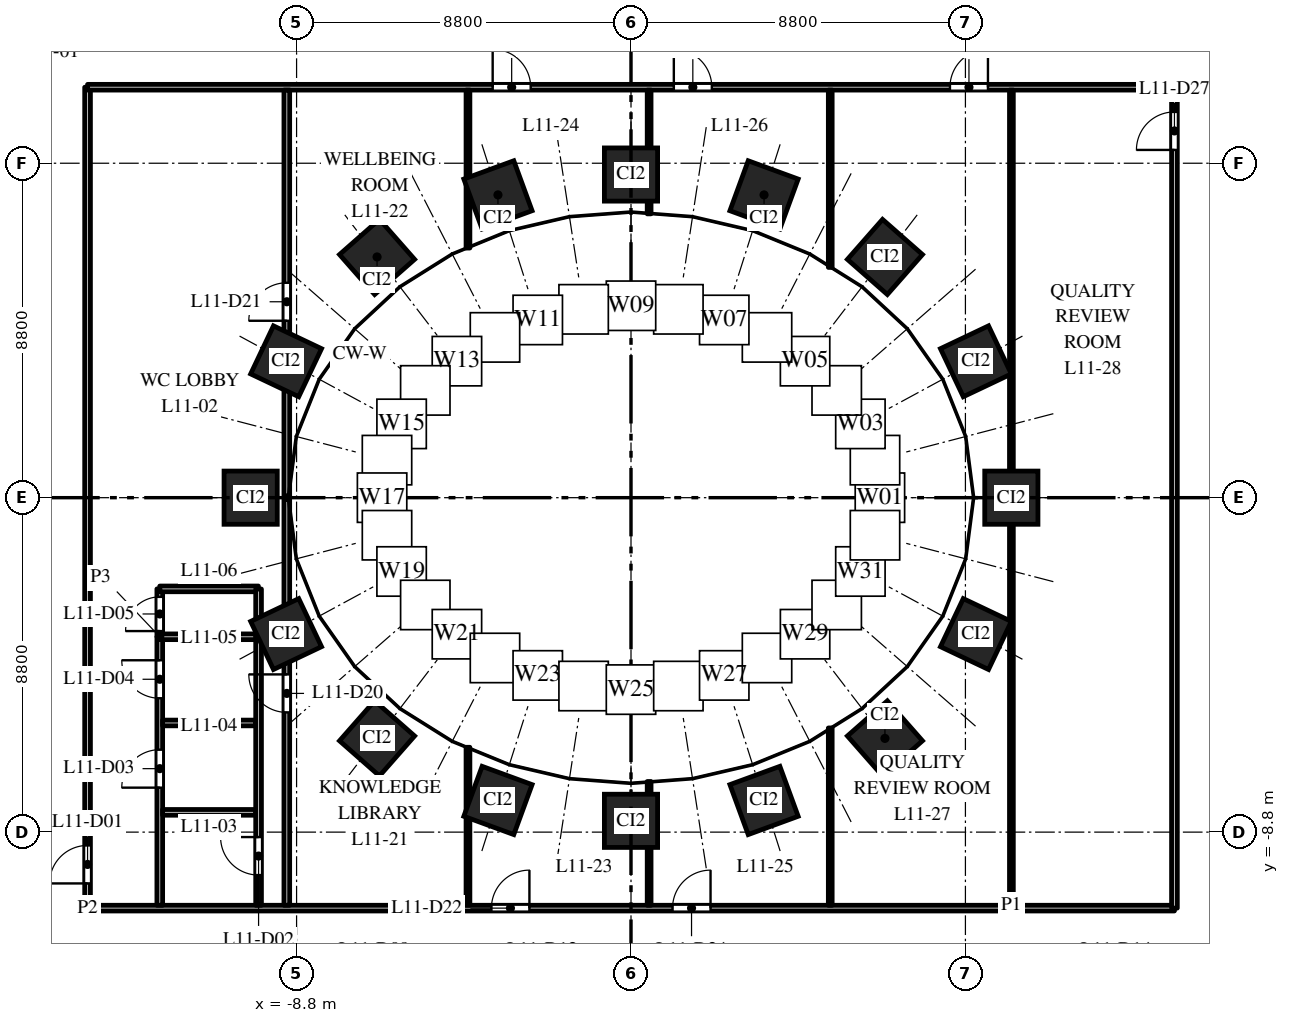
"""IFC4 building model, lengths in metres.
Left out: names, types, materials, properties, quantities, classifications, styles, units other than length and angle.
Written with IfcOpenShell. Run it as: python <this file> out.ifc"""

import sys

from ifc_helpers import new_model, si_unit, direction, frame, frame_2d, origin, origin_2d, place, context, subcontext, project, spatial, rectangle, extrude, element, fill, save


model = new_model("IFC4")
c1 = context("Model", 3, precision=1e-05, world=origin(), true_north=direction((0.0, 1.0)))
c2 = subcontext(c1, "Body", "Model", "MODEL_VIEW")
j1 = project(units=[si_unit("LENGTHUNIT", "METRE"), si_unit("PLANEANGLEUNIT", "RADIAN")], contexts=[c1])
p1 = place(None, origin())
s1 = spatial("IfcSite", under=j1, at=p1, CompositionType="ELEMENT")
p2 = place(p1, origin())
s2 = spatial("IfcBuilding", under=s1, at=p2, CompositionType="ELEMENT")
p3 = place(p2, frame((0.0, 0.0, 54.5)))
s3 = spatial("IfcBuildingStorey", under=s2, at=p3, CompositionType="ELEMENT", Elevation=54.5)
for number, where, z_axis, x_axis in (
    (1, (10.008, 0.0, 0.0), (0.0, 0.0, 1.0), (0.0, 1.0, 0.0)),
    (2, (9.076, 3.588, 0.0), (0.0, 0.0, 1.0), (-0.429, 0.903, 0.0)),
    (3, (6.682, 6.334, 0.0), (0.0, 0.0, 1.0), (-0.751, 0.66, 0.0)),
    (4, (3.501, 7.967, 0.0), (0.0, 0.0, 1.0), (-0.939, 0.344, 0.0)),
    (5, (0.0, 8.503, 0.0), (0.0, 0.0, 1.0), (-1.0, 0.0, 0.0)),
    (6, (-3.501, 7.967, 0.0), (0.0, 0.0, 1.0), (-0.939, -0.344, 0.0)),
    (7, (-6.682, 6.334, 0.0), (0.0, 0.0, 1.0), (-0.751, -0.66, 0.0)),
    (8, (-9.076, 3.588, 0.0), (0.0, 0.0, 1.0), (-0.429, -0.903, 0.0)),
    (9, (-10.008, 0.0, 0.0), (0.0, 0.0, 1.0), (0.0, -1.0, 0.0)),
    (10, (-9.076, -3.588, 0.0), (0.0, 0.0, 1.0), (0.429, -0.903, 0.0)),
    (11, (-6.682, -6.334, 0.0), (0.0, 0.0, 1.0), (0.751, -0.66, 0.0)),
    (12, (-3.501, -7.967, 0.0), (0.0, 0.0, 1.0), (0.939, -0.344, 0.0)),
    (13, (0.0, -8.503, 0.0), (0.0, 0.0, 1.0), (1.0, 0.0, 0.0)),
    (14, (3.501, -7.967, 0.0), (0.0, 0.0, 1.0), (0.939, 0.344, 0.0)),
    (15, (6.682, -6.334, 0.0), (0.0, 0.0, 1.0), (0.751, 0.66, 0.0)),
    (16, (9.076, -3.588, 0.0), (0.0, 0.0, 1.0), (0.429, 0.903, 0.0)),
):
    element("IfcColumn", number, at=place(p3, frame(where, z_axis=z_axis, x_axis=x_axis)), inside=s3, PredefinedType="COLUMN", context=c2, shape_type="SweptSolid", body=[
        extrude(rectangle(XDim=1.4, YDim=1.4, at=origin_2d()), origin(), (0.0, 0.0, 1.0), 4.0),
    ])
p4 = place(p3, frame((-14.3, -10.8, 0.0), z_axis=(0.0, 0.0, 1.0), x_axis=(0.0, 1.0, 0.0)))
e17 = element("IfcWall", 17, at=p4, inside=s3, PredefinedType="PARTITIONING", context=c2, shape_type="SweptSolid", body=[
    extrude(rectangle(XDim=21.6, YDim=0.15, at=frame_2d((10.8, 0.0))), origin(), (0.0, 0.0, 1.0), 2.75),
])
p5 = place(p4, frame((0.65, 0.0, 0.0)))
e18 = element("IfcOpeningElement", 18, at=p5, cuts=e17, PredefinedType="OPENING", context=c2, shape_type="SweptSolid", body=[
    extrude(rectangle(XDim=1.0, YDim=2.1, at=frame_2d((0.5, 1.05))), frame((0.0, 0.085, 0.0), z_axis=(0.0, -1.0, 0.0), x_axis=(1.0, 0.0, 0.0)), (0.0, 0.0, 1.0), 0.17),
])
p6 = place(p3, frame((-14.3, -10.8, 0.0), z_axis=(0.0, 0.0, 1.0), x_axis=(1.0, 0.0, 0.0)))
e19 = element("IfcWall", 19, at=p6, inside=s3, PredefinedType="PARTITIONING", context=c2, shape_type="SweptSolid", body=[
    extrude(rectangle(XDim=28.6, YDim=0.15, at=frame_2d((14.3, 0.0))), origin(), (0.0, 0.0, 1.0), 2.85),
])
p7 = place(p6, frame((10.627, 0.0, 0.0)))
e20 = element("IfcOpeningElement", 20, at=p7, cuts=e19, PredefinedType="OPENING", context=c2, shape_type="SweptSolid", body=[
    extrude(rectangle(XDim=1.0, YDim=2.1, at=frame_2d((0.5, 1.05))), frame((0.0, 0.085, 0.0), z_axis=(0.0, -1.0, 0.0), x_axis=(1.0, 0.0, 0.0)), (0.0, 0.0, 1.0), 0.17),
])
p8 = place(p6, frame((15.393, 0.0, 0.0)))
e21 = element("IfcOpeningElement", 21, at=p8, cuts=e19, PredefinedType="OPENING", context=c2, shape_type="SweptSolid", body=[
    extrude(rectangle(XDim=1.0, YDim=2.1, at=frame_2d((0.5, 1.05))), frame((0.0, 0.085, 0.0), z_axis=(0.0, -1.0, 0.0), x_axis=(1.0, 0.0, 0.0)), (0.0, 0.0, 1.0), 0.17),
])
p9 = place(p3, frame((-14.3, 10.8, 0.0), z_axis=(0.0, 0.0, 1.0), x_axis=(1.0, 0.0, 0.0)))
e22 = element("IfcWall", 22, at=p9, inside=s3, PredefinedType="PARTITIONING", context=c2, shape_type="SweptSolid", body=[
    extrude(rectangle(XDim=28.6, YDim=0.15, at=frame_2d((14.3, 0.0))), origin(), (0.0, 0.0, 1.0), 2.85),
])
p10 = place(p9, frame((10.66, 0.0, 0.0)))
e23 = element("IfcOpeningElement", 23, at=p10, cuts=e22, PredefinedType="OPENING", context=c2, shape_type="SweptSolid", body=[
    extrude(rectangle(XDim=1.0, YDim=2.1, at=frame_2d((0.5, 1.05))), frame((0.0, 0.085, 0.0), z_axis=(0.0, -1.0, 0.0), x_axis=(1.0, 0.0, 0.0)), (0.0, 0.0, 1.0), 0.17),
])
p11 = place(p9, frame((15.427, 0.0, 0.0)))
e24 = element("IfcOpeningElement", 24, at=p11, cuts=e22, PredefinedType="OPENING", context=c2, shape_type="SweptSolid", body=[
    extrude(rectangle(XDim=1.0, YDim=2.1, at=frame_2d((0.5, 1.05))), frame((0.0, 0.085, 0.0), z_axis=(0.0, -1.0, 0.0), x_axis=(1.0, 0.0, 0.0)), (0.0, 0.0, 1.0), 0.17),
])
p12 = place(p9, frame((22.693, 0.0, 0.0)))
e25 = element("IfcOpeningElement", 25, at=p12, cuts=e22, PredefinedType="OPENING", context=c2, shape_type="SweptSolid", body=[
    extrude(rectangle(XDim=1.0, YDim=2.1, at=frame_2d((0.5, 1.05))), frame((0.0, 0.085, 0.0), z_axis=(0.0, -1.0, 0.0), x_axis=(1.0, 0.0, 0.0)), (0.0, 0.0, 1.0), 0.17),
])
p13 = place(p3, frame((-12.4, -10.725, 0.0), z_axis=(0.0, 0.0, 1.0), x_axis=(0.0, 1.0, 0.0)))
e26 = element("IfcWall", 26, at=p13, inside=s3, PredefinedType="PARTITIONING", context=c2, shape_type="SweptSolid", body=[
    extrude(rectangle(XDim=7.065, YDim=0.15, at=frame_2d((3.533, 0.0))), origin(), (0.0, 0.0, 1.0), 2.75),
])
p14 = place(p13, frame((3.095, 0.0, 0.0)))
e27 = element("IfcOpeningElement", 27, at=p14, cuts=e26, PredefinedType="OPENING", context=c2, shape_type="SweptSolid", body=[
    extrude(rectangle(XDim=1.0, YDim=2.1, at=frame_2d((0.5, 1.05))), frame((0.0, 0.085, 0.0), z_axis=(0.0, -1.0, 0.0), x_axis=(1.0, 0.0, 0.0)), (0.0, 0.0, 1.0), 0.17),
])
p15 = place(p13, frame((5.447, 0.0, 0.0)))
e28 = element("IfcOpeningElement", 28, at=p15, cuts=e26, PredefinedType="OPENING", context=c2, shape_type="SweptSolid", body=[
    extrude(rectangle(XDim=1.0, YDim=2.1, at=frame_2d((0.5, 1.05))), frame((0.0, 0.085, 0.0), z_axis=(0.0, -1.0, 0.0), x_axis=(1.0, 0.0, 0.0)), (0.0, 0.0, 1.0), 0.17),
])
p16 = place(p3, frame((-12.325, -8.28, 0.0), z_axis=(0.0, 0.0, 1.0), x_axis=(1.0, 0.0, 0.0)))
e29 = element("IfcWall", 29, at=p16, inside=s3, PredefinedType="PARTITIONING", context=c2, shape_type="SweptSolid", body=[
    extrude(rectangle(XDim=2.45, YDim=0.15, at=frame_2d((1.225, 0.0))), origin(), (0.0, 0.0, 1.0), 2.75),
])
p17 = place(p3, frame((-12.325, -5.928, 0.0), z_axis=(0.0, 0.0, 1.0), x_axis=(1.0, 0.0, 0.0)))
e30 = element("IfcWall", 30, at=p17, inside=s3, PredefinedType="PARTITIONING", context=c2, shape_type="SweptSolid", body=[
    extrude(rectangle(XDim=2.45, YDim=0.15, at=frame_2d((1.225, 0.0))), origin(), (0.0, 0.0, 1.0), 3.7),
])
p18 = place(p3, frame((-12.4, -3.66, 0.0), z_axis=(0.0, 0.0, 1.0), x_axis=(0.0, 1.0, 0.0)))
e31 = element("IfcWall", 31, at=p18, inside=s3, PredefinedType="PARTITIONING", context=c2, shape_type="SweptSolid", body=[
    extrude(rectangle(XDim=1.26, YDim=0.15, at=frame_2d((0.63, 0.0))), origin(), (0.0, 0.0, 1.0), 3.7),
])
p19 = place(p18, frame((0.15, 0.0, 0.0)))
e32 = element("IfcOpeningElement", 32, at=p19, cuts=e31, PredefinedType="OPENING", context=c2, shape_type="SweptSolid", body=[
    extrude(rectangle(XDim=0.9, YDim=2.1, at=frame_2d((0.45, 1.05))), frame((0.0, 0.085, 0.0), z_axis=(0.0, -1.0, 0.0), x_axis=(1.0, 0.0, 0.0)), (0.0, 0.0, 1.0), 0.17),
])
p20 = place(p3, frame((-12.4, -3.66, 0.0), z_axis=(0.0, 0.0, 1.0), x_axis=(1.0, 0.0, 0.0)))
e33 = element("IfcWall", 33, at=p20, inside=s3, PredefinedType="PARTITIONING", context=c2, shape_type="SweptSolid", body=[
    extrude(rectangle(XDim=2.6, YDim=0.15, at=frame_2d((1.3, 0.0))), origin(), (0.0, 0.0, 1.0), 3.7),
])
p21 = place(p3, frame((-12.4, -2.4, 0.0), z_axis=(0.0, 0.0, 1.0), x_axis=(1.0, 0.0, 0.0)))
e34 = element("IfcWall", 34, at=p21, inside=s3, PredefinedType="PARTITIONING", context=c2, shape_type="SweptSolid", body=[
    extrude(rectangle(XDim=2.596, YDim=0.15, at=frame_2d((1.298, 0.0))), origin(), (0.0, 0.0, 1.0), 3.7),
])
p22 = place(p3, frame((-9.8, -10.725, 0.0), z_axis=(0.0, 0.0, 1.0), x_axis=(0.0, 1.0, 0.0)))
e35 = element("IfcWall", 35, at=p22, inside=s3, PredefinedType="PARTITIONING", context=c2, shape_type="SweptSolid", body=[
    extrude(rectangle(XDim=7.065, YDim=0.15, at=frame_2d((3.533, 0.0))), origin(), (0.0, 0.0, 1.0), 2.75),
])
p23 = place(p22, frame((0.795, 0.0, 0.0)))
e36 = element("IfcOpeningElement", 36, at=p23, cuts=e35, PredefinedType="OPENING", context=c2, shape_type="SweptSolid", body=[
    extrude(rectangle(XDim=1.0, YDim=2.1, at=frame_2d((0.5, 1.05))), frame((0.0, 0.085, 0.0), z_axis=(0.0, -1.0, 0.0), x_axis=(1.0, 0.0, 0.0)), (0.0, 0.0, 1.0), 0.17),
])
p24 = place(p3, frame((-9.8, -3.66, 0.0), z_axis=(0.0, 0.0, 1.0), x_axis=(0.0, 1.0, 0.0)))
e37 = element("IfcWall", 37, at=p24, inside=s3, PredefinedType="PARTITIONING", context=c2, shape_type="SweptSolid", body=[
    extrude(rectangle(XDim=1.256, YDim=0.15, at=frame_2d((0.628, 0.0))), origin(), (0.0, 0.0, 1.0), 3.7),
])
p25 = place(p3, frame((-9.057, -10.725, 0.0), z_axis=(0.0, 0.0, 1.0), x_axis=(0.0, 1.0, 0.0)))
e38 = element("IfcWall", 38, at=p25, inside=s3, PredefinedType="PARTITIONING", context=c2, shape_type="SweptSolid", body=[
    extrude(rectangle(XDim=10.68, YDim=0.15, at=frame_2d((5.34, 0.0))), origin(), (0.0, 0.0, 1.0), 2.75),
])
p26 = place(p25, frame((5.075, 0.0, 0.0)))
e39 = element("IfcOpeningElement", 39, at=p26, cuts=e38, PredefinedType="OPENING", context=c2, shape_type="SweptSolid", body=[
    extrude(rectangle(XDim=1.0, YDim=2.1, at=frame_2d((0.5, 1.05))), frame((0.0, 0.085, 0.0), z_axis=(0.0, -1.0, 0.0), x_axis=(1.0, 0.0, 0.0)), (0.0, 0.0, 1.0), 0.17),
])
p27 = place(p3, frame((-9.057, 0.045, 0.0), z_axis=(0.0, 0.0, 1.0), x_axis=(0.0, 1.0, 0.0)))
e40 = element("IfcWall", 40, at=p27, inside=s3, PredefinedType="PARTITIONING", context=c2, shape_type="SweptSolid", body=[
    extrude(rectangle(XDim=10.68, YDim=0.15, at=frame_2d((5.34, 0.0))), origin(), (0.0, 0.0, 1.0), 2.75),
])
p28 = place(p27, frame((4.61, 0.0, 0.0)))
e41 = element("IfcOpeningElement", 41, at=p28, cuts=e40, PredefinedType="OPENING", context=c2, shape_type="SweptSolid", body=[
    extrude(rectangle(XDim=1.0, YDim=2.1, at=frame_2d((0.5, 1.05))), frame((0.0, 0.085, 0.0), z_axis=(0.0, -1.0, 0.0), x_axis=(1.0, 0.0, 0.0)), (0.0, 0.0, 1.0), 0.17),
])
for number, where, z_axis, x_axis in (
    (42, (-4.29, -10.725, 0.0), (0.0, 0.0, 1.0), (0.0, 1.0, 0.0)),
    (43, (-4.29, 6.568, 0.0), (0.0, 0.0, 1.0), (0.0, 1.0, 0.0)),
):
    element("IfcWall", number, at=place(p3, frame(where, z_axis=z_axis, x_axis=x_axis)), inside=s3, PredefinedType="PARTITIONING", context=c2, shape_type="SweptSolid", body=[
        extrude(rectangle(XDim=4.157, YDim=0.1, at=frame_2d((2.079, 0.0))), origin(), (0.0, 0.0, 1.0), 2.85),
    ])
for number, where, z_axis, x_axis in (
    (44, (0.477, -10.725, 0.0), (0.0, 0.0, 1.0), (0.0, 1.0, 0.0)),
    (45, (0.477, 7.468, 0.0), (0.0, 0.0, 1.0), (0.0, 1.0, 0.0)),
):
    element("IfcWall", number, at=place(p3, frame(where, z_axis=z_axis, x_axis=x_axis)), inside=s3, PredefinedType="PARTITIONING", context=c2, shape_type="SweptSolid", body=[
        extrude(rectangle(XDim=3.257, YDim=0.1, at=frame_2d((1.628, 0.0))), origin(), (0.0, 0.0, 1.0), 2.85),
    ])
for number, where, z_axis, x_axis in (
    (46, (5.243, -10.725, 0.0), (0.0, 0.0, 1.0), (0.0, 1.0, 0.0)),
    (47, (5.243, 6.059, 0.0), (0.0, 0.0, 1.0), (0.0, 1.0, 0.0)),
):
    element("IfcWall", number, at=place(p3, frame(where, z_axis=z_axis, x_axis=x_axis)), inside=s3, PredefinedType="PARTITIONING", context=c2, shape_type="SweptSolid", body=[
        extrude(rectangle(XDim=4.666, YDim=0.1, at=frame_2d((2.333, 0.0))), origin(), (0.0, 0.0, 1.0), 2.85),
    ])
p29 = place(p3, frame((10.01, -10.725, 0.0), z_axis=(0.0, 0.0, 1.0), x_axis=(0.0, 1.0, 0.0)))
e48 = element("IfcWall", 48, at=p29, inside=s3, PredefinedType="PARTITIONING", context=c2, shape_type="SweptSolid", body=[
    extrude(rectangle(XDim=21.45, YDim=0.1, at=frame_2d((10.725, 0.0))), origin(), (0.0, 0.0, 1.0), 2.75),
])
p30 = place(p3, frame((14.3, -10.8, 0.0), z_axis=(0.0, 0.0, 1.0), x_axis=(0.0, 1.0, 0.0)))
e49 = element("IfcWall", 49, at=p30, inside=s3, PredefinedType="PARTITIONING", context=c2, shape_type="SweptSolid", body=[
    extrude(rectangle(XDim=21.6, YDim=0.15, at=frame_2d((10.8, 0.0))), origin(), (0.0, 0.0, 1.0), 2.75),
])
p31 = place(p30, frame((19.95, 0.0, 0.0)))
e50 = element("IfcOpeningElement", 50, at=p31, cuts=e49, PredefinedType="OPENING", context=c2, shape_type="SweptSolid", body=[
    extrude(rectangle(XDim=1.0, YDim=2.1, at=frame_2d((0.5, 1.05))), frame((0.0, 0.085, 0.0), z_axis=(0.0, -1.0, 0.0), x_axis=(1.0, 0.0, 0.0)), (0.0, 0.0, 1.0), 0.17),
])
p32 = place(p5, origin())
e51 = element("IfcDoor", 51, at=p32, inside=s3, OperationType="SINGLE_SWING_LEFT", PredefinedType="DOOR", context=c2, shape_type="SweptSolid", body=[
    extrude(rectangle(XDim=1.0, YDim=2.1, at=frame_2d((0.5, 1.05))), frame((0.0, 0.025, 0.0), z_axis=(0.0, -1.0, 0.0), x_axis=(1.0, 0.0, 0.0)), (0.0, 0.0, 1.0), 0.05),
])
fill(e18, e51)
p33 = place(p23, origin())
e52 = element("IfcDoor", 52, at=p33, inside=s3, OperationType="SINGLE_SWING_RIGHT", PredefinedType="DOOR", context=c2, shape_type="SweptSolid", body=[
    extrude(rectangle(XDim=1.0, YDim=2.1, at=frame_2d((0.5, 1.05))), frame((0.0, 0.025, 0.0), z_axis=(0.0, -1.0, 0.0), x_axis=(1.0, 0.0, 0.0)), (0.0, 0.0, 1.0), 0.05),
])
fill(e36, e52)
p34 = place(p14, origin())
e53 = element("IfcDoor", 53, at=p34, inside=s3, OperationType="SINGLE_SWING_LEFT", PredefinedType="DOOR", context=c2, shape_type="SweptSolid", body=[
    extrude(rectangle(XDim=1.0, YDim=2.1, at=frame_2d((0.5, 1.05))), frame((0.0, 0.025, 0.0), z_axis=(0.0, -1.0, 0.0), x_axis=(1.0, 0.0, 0.0)), (0.0, 0.0, 1.0), 0.05),
])
fill(e27, e53)
p35 = place(p15, origin())
e54 = element("IfcDoor", 54, at=p35, inside=s3, OperationType="SINGLE_SWING_RIGHT", PredefinedType="DOOR", context=c2, shape_type="SweptSolid", body=[
    extrude(rectangle(XDim=1.0, YDim=2.1, at=frame_2d((0.5, 1.05))), frame((0.0, 0.025, 0.0), z_axis=(0.0, -1.0, 0.0), x_axis=(1.0, 0.0, 0.0)), (0.0, 0.0, 1.0), 0.05),
])
fill(e28, e54)
p36 = place(p19, origin())
e55 = element("IfcDoor", 55, at=p36, inside=s3, OperationType="SINGLE_SWING_LEFT", PredefinedType="DOOR", context=c2, shape_type="SweptSolid", body=[
    extrude(rectangle(XDim=0.9, YDim=2.1, at=frame_2d((0.45, 1.05))), frame((0.0, 0.025, 0.0), z_axis=(0.0, -1.0, 0.0), x_axis=(1.0, 0.0, 0.0)), (0.0, 0.0, 1.0), 0.05),
])
fill(e32, e55)
p37 = place(p26, origin())
e56 = element("IfcDoor", 56, at=p37, inside=s3, OperationType="SINGLE_SWING_RIGHT", PredefinedType="DOOR", context=c2, shape_type="SweptSolid", body=[
    extrude(rectangle(XDim=1.0, YDim=2.1, at=frame_2d((0.5, 1.05))), frame((0.0, 0.025, 0.0), z_axis=(0.0, -1.0, 0.0), x_axis=(1.0, 0.0, 0.0)), (0.0, 0.0, 1.0), 0.05),
])
fill(e39, e56)
p38 = place(p28, origin())
e57 = element("IfcDoor", 57, at=p38, inside=s3, OperationType="SINGLE_SWING_LEFT", PredefinedType="DOOR", context=c2, shape_type="SweptSolid", body=[
    extrude(rectangle(XDim=1.0, YDim=2.1, at=frame_2d((0.5, 1.05))), frame((0.0, 0.025, 0.0), z_axis=(0.0, -1.0, 0.0), x_axis=(1.0, 0.0, 0.0)), (0.0, 0.0, 1.0), 0.05),
])
fill(e41, e57)
p39 = place(p7, origin())
e58 = element("IfcDoor", 58, at=p39, inside=s3, OperationType="SINGLE_SWING_RIGHT", PredefinedType="DOOR", context=c2, shape_type="SweptSolid", body=[
    extrude(rectangle(XDim=1.0, YDim=2.1, at=frame_2d((0.5, 1.05))), frame((0.0, 0.025, 0.0), z_axis=(0.0, -1.0, 0.0), x_axis=(1.0, 0.0, 0.0)), (0.0, 0.0, 1.0), 0.05),
])
fill(e20, e58)
p40 = place(p10, origin())
e59 = element("IfcDoor", 59, at=p40, inside=s3, OperationType="SINGLE_SWING_LEFT", PredefinedType="DOOR", context=c2, shape_type="SweptSolid", body=[
    extrude(rectangle(XDim=1.0, YDim=2.1, at=frame_2d((0.5, 1.05))), frame((0.0, 0.025, 0.0), z_axis=(0.0, -1.0, 0.0), x_axis=(1.0, 0.0, 0.0)), (0.0, 0.0, 1.0), 0.05),
])
fill(e23, e59)
p41 = place(p8, origin())
e60 = element("IfcDoor", 60, at=p41, inside=s3, OperationType="SINGLE_SWING_RIGHT", PredefinedType="DOOR", context=c2, shape_type="SweptSolid", body=[
    extrude(rectangle(XDim=1.0, YDim=2.1, at=frame_2d((0.5, 1.05))), frame((0.0, 0.025, 0.0), z_axis=(0.0, -1.0, 0.0), x_axis=(1.0, 0.0, 0.0)), (0.0, 0.0, 1.0), 0.05),
])
fill(e21, e60)
p42 = place(p11, origin())
e61 = element("IfcDoor", 61, at=p42, inside=s3, OperationType="SINGLE_SWING_LEFT", PredefinedType="DOOR", context=c2, shape_type="SweptSolid", body=[
    extrude(rectangle(XDim=1.0, YDim=2.1, at=frame_2d((0.5, 1.05))), frame((0.0, 0.025, 0.0), z_axis=(0.0, -1.0, 0.0), x_axis=(1.0, 0.0, 0.0)), (0.0, 0.0, 1.0), 0.05),
])
fill(e24, e61)
p43 = place(p12, origin())
e62 = element("IfcDoor", 62, at=p43, inside=s3, OperationType="SINGLE_SWING_RIGHT", PredefinedType="DOOR", context=c2, shape_type="SweptSolid", body=[
    extrude(rectangle(XDim=1.0, YDim=2.1, at=frame_2d((0.5, 1.05))), frame((0.0, 0.025, 0.0), z_axis=(0.0, -1.0, 0.0), x_axis=(1.0, 0.0, 0.0)), (0.0, 0.0, 1.0), 0.05),
])
fill(e25, e62)
p44 = place(p31, origin())
e63 = element("IfcDoor", 63, at=p44, inside=s3, OperationType="SINGLE_SWING_LEFT", PredefinedType="DOOR", context=c2, shape_type="SweptSolid", body=[
    extrude(rectangle(XDim=1.0, YDim=2.1, at=frame_2d((0.5, 1.05))), frame((0.0, 0.025, 0.0), z_axis=(0.0, -1.0, 0.0), x_axis=(1.0, 0.0, 0.0)), (0.0, 0.0, 1.0), 0.05),
])
fill(e50, e63)
save(model, sys.argv[1])
